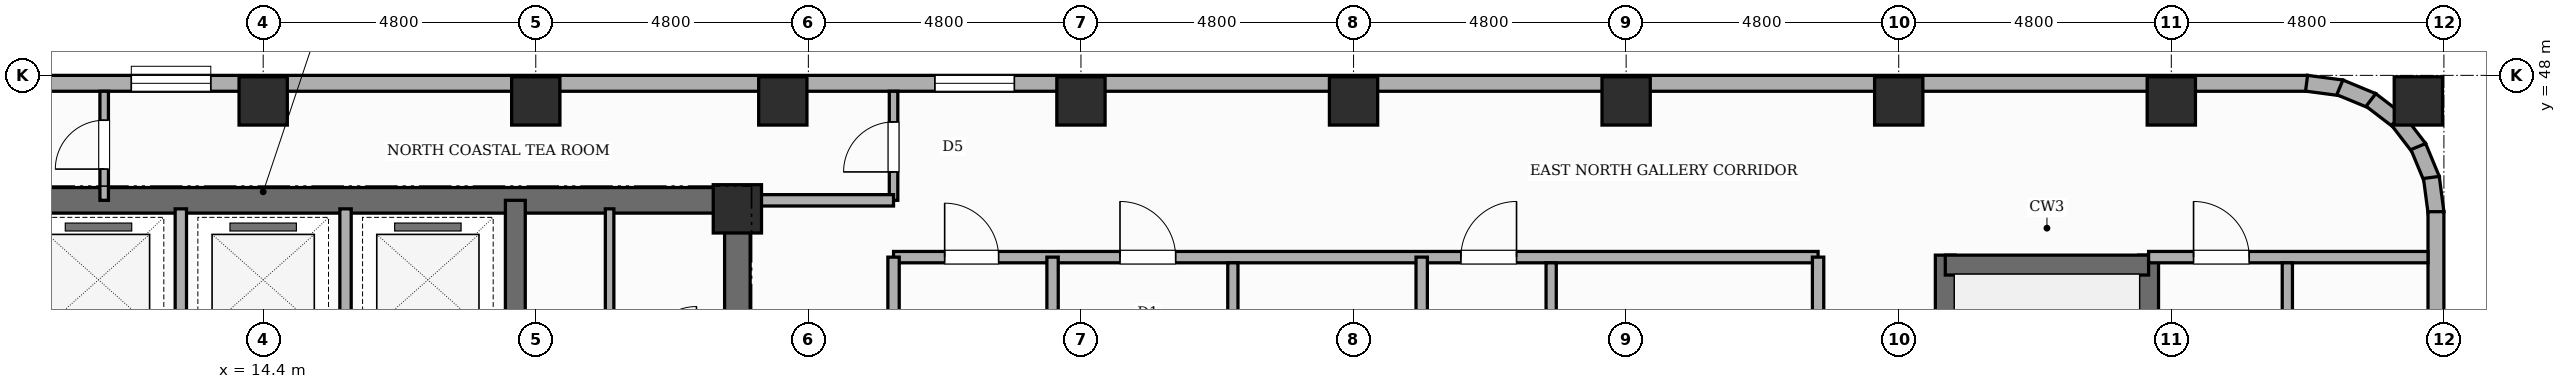
"""IFC4 building model, lengths in metres.
Left out: names, types, materials, properties, quantities, classifications, styles, units other than length and angle.
Written with IfcOpenShell. Run it as: python <this file> out.ifc"""

import sys

from ifc_helpers import new_model, si_unit, direction, frame, frame_2d, origin, origin_2d, place, context, subcontext, project, spatial, rectangle, extrude, element, fill, save


model = new_model("IFC4")
c1 = context("Model", 3, precision=1e-05, world=origin(), true_north=direction((0.0, 1.0)))
c2 = subcontext(c1, "Body", "Model", "MODEL_VIEW")
j1 = project(units=[si_unit("LENGTHUNIT", "METRE"), si_unit("PLANEANGLEUNIT", "RADIAN")], contexts=[c1])
p1 = place(None, origin())
s1 = spatial("IfcSite", under=j1, at=p1, CompositionType="ELEMENT")
p2 = place(p1, origin())
s2 = spatial("IfcBuilding", under=s1, at=p2, CompositionType="ELEMENT")
p3 = place(p2, frame((0.0, 0.0, 207.4)))
s3 = spatial("IfcBuildingStorey", under=s2, at=p3, CompositionType="ELEMENT", Elevation=207.4)
p4 = place(p3, frame((22.75, 30.675, 0.0), z_axis=(0.0, 0.0, 1.0), x_axis=(0.0, 1.0, 0.0)))
e1 = element("IfcWall", 1, at=p4, inside=s3, PredefinedType="SHEAR", context=c2, shape_type="SweptSolid", body=[
    extrude(rectangle(XDim=15.35, YDim=0.45, at=frame_2d((7.675, 0.0))), origin(), (0.0, 0.0, 1.0), 3.6),
])
p5 = place(p4, frame((10.675, 0.0, 0.0)))
e2 = element("IfcOpeningElement", 2, at=p5, cuts=e1, PredefinedType="OPENING", context=c2, shape_type="SweptSolid", body=[
    extrude(rectangle(XDim=1.0, YDim=2.15, at=frame_2d((0.5, 1.075))), frame((0.0, 0.235, 0.0), z_axis=(0.0, -1.0, 0.0), x_axis=(1.0, 0.0, 0.0)), (0.0, 0.0, 1.0), 0.47),
])
p6 = place(p3, frame((6.05, 45.8, 0.0), z_axis=(0.0, 0.0, 1.0), x_axis=(1.0, 0.0, 0.0)))
e3 = element("IfcWall", 3, at=p6, inside=s3, PredefinedType="SHEAR", context=c2, shape_type="SweptSolid", body=[
    extrude(rectangle(XDim=16.7, YDim=0.45, at=frame_2d((8.35, 0.0))), origin(), (0.0, 0.0, 1.0), 3.6),
])
p7 = place(p3, frame((18.84, 30.9, 0.0), z_axis=(0.0, 0.0, 1.0), x_axis=(0.0, 1.0, 0.0)))
e4 = element("IfcWall", 4, at=p7, inside=s3, PredefinedType="SHEAR", context=c2, shape_type="SweptSolid", body=[
    extrude(rectangle(XDim=14.9, YDim=0.35, at=frame_2d((7.45, 0.0))), origin(), (0.0, 0.0, 1.0), 3.6),
])
p8 = place(p7, frame((0.65, 0.0, 0.0)))
e5 = element("IfcOpeningElement", 5, at=p8, cuts=e4, PredefinedType="OPENING", context=c2, shape_type="SweptSolid", body=[
    extrude(rectangle(XDim=0.95, YDim=2.1, at=frame_2d((0.475, 1.05))), frame((0.0, 0.185, 0.0), z_axis=(0.0, -1.0, 0.0), x_axis=(1.0, 0.0, 0.0)), (0.0, 0.0, 1.0), 0.37),
])
p9 = place(p7, frame((10.45, 0.0, 0.0)))
e6 = element("IfcOpeningElement", 6, at=p9, cuts=e4, PredefinedType="OPENING", context=c2, shape_type="SweptSolid", body=[
    extrude(rectangle(XDim=1.0, YDim=2.15, at=frame_2d((0.5, 1.075))), frame((0.0, 0.185, 0.0), z_axis=(0.0, -1.0, 0.0), x_axis=(1.0, 0.0, 0.0)), (0.0, 0.0, 1.0), 0.37),
])
p10 = place(p3, frame((44.02, 35.865, 0.0), z_axis=(0.0, 0.0, 1.0), x_axis=(0.0, 1.0, 0.0)))
e7 = element("IfcWall", 7, at=p10, inside=s3, PredefinedType="SHEAR", context=c2, shape_type="SweptSolid", body=[
    extrude(rectangle(XDim=8.97, YDim=0.35, at=frame_2d((4.485, 0.0))), origin(), (0.0, 0.0, 1.0), 3.6),
])
p11 = place(p10, frame((0.65, 0.0, 0.0)))
e8 = element("IfcOpeningElement", 8, at=p11, cuts=e7, PredefinedType="OPENING", context=c2, shape_type="SweptSolid", body=[
    extrude(rectangle(XDim=0.95, YDim=2.1, at=frame_2d((0.475, 1.05))), frame((0.0, 0.185, 0.0), z_axis=(0.0, -1.0, 0.0), x_axis=(1.0, 0.0, 0.0)), (0.0, 0.0, 1.0), 0.37),
])
p12 = place(p3, frame((47.6, 35.865, 0.0), z_axis=(0.0, 0.0, 1.0), x_axis=(0.0, 1.0, 0.0)))
e9 = element("IfcWall", 9, at=p12, inside=s3, PredefinedType="SHEAR", context=c2, shape_type="SweptSolid", body=[
    extrude(rectangle(XDim=8.97, YDim=0.35, at=frame_2d((4.485, 0.0))), origin(), (0.0, 0.0, 1.0), 3.6),
])
p13 = place(p3, frame((44.02, 44.66, 0.0), z_axis=(0.0, 0.0, 1.0), x_axis=(1.0, 0.0, 0.0)))
e10 = element("IfcWall", 10, at=p13, inside=s3, PredefinedType="SHEAR", context=c2, shape_type="SweptSolid", body=[
    extrude(rectangle(XDim=3.58, YDim=0.35, at=frame_2d((1.79, 0.0))), origin(), (0.0, 0.0, 1.0), 3.6),
])
for number, where, z_axis, x_axis in (
    (11, (14.4, 47.55, 0.0), (0.0, 0.0, 1.0), (1.0, 0.0, 0.0)),
    (12, (19.2, 47.55, 0.0), (0.0, 0.0, 1.0), (1.0, 0.0, 0.0)),
    (13, (22.75, 45.65, 0.0), (0.0, 0.0, 1.0), (1.0, 0.0, 0.0)),
    (14, (23.55, 47.55, 0.0), (0.0, 0.0, 1.0), (1.0, 0.0, 0.0)),
    (15, (28.8, 47.55, 0.0), (0.0, 0.0, 1.0), (1.0, 0.0, 0.0)),
    (16, (33.6, 47.55, 0.0), (0.0, 0.0, 1.0), (1.0, 0.0, 0.0)),
    (17, (38.4, 47.55, 0.0), (0.0, 0.0, 1.0), (1.0, 0.0, 0.0)),
    (18, (43.2, 47.55, 0.0), (0.0, 0.0, 1.0), (1.0, 0.0, 0.0)),
    (19, (48.0, 47.55, 0.0), (0.0, 0.0, 1.0), (1.0, 0.0, 0.0)),
    (20, (52.35, 47.55, 0.0), (0.0, 0.0, 1.0), (1.0, 0.0, 0.0)),
):
    element("IfcColumn", number, at=place(p3, frame(where, z_axis=z_axis, x_axis=x_axis)), inside=s3, PredefinedType="COLUMN", context=c2, shape_type="SweptSolid", body=[
        extrude(rectangle(XDim=0.85, YDim=0.85, at=origin_2d()), origin(), (0.0, 0.0, 1.0), 3.6),
    ])
p14 = place(p3, frame((7.2, 47.86, 0.0), z_axis=(0.0, 0.0, 1.0), x_axis=(1.0, 0.0, 0.0)))
e21 = element("IfcWall", 21, at=p14, inside=s3, PredefinedType="STANDARD", context=c2, shape_type="SweptSolid", body=[
    extrude(rectangle(XDim=43.2, YDim=0.28, at=frame_2d((21.6, 0.0))), origin(), (0.0, 0.0, 1.0), 2.66),
])
p15 = place(p14, frame((19.028, 0.0, 0.65)))
e22 = element("IfcOpeningElement", 22, at=p15, cuts=e21, PredefinedType="OPENING", context=c2, shape_type="SweptSolid", body=[
    extrude(rectangle(XDim=1.4, YDim=1.1, at=frame_2d((0.7, 0.55))), frame((0.0, 0.15, 0.0), z_axis=(0.0, -1.0, 0.0), x_axis=(1.0, 0.0, 0.0)), (0.0, 0.0, 1.0), 0.3),
])
p16 = place(p14, frame((0.308, 0.0, 0.65)))
e23 = element("IfcOpeningElement", 23, at=p16, cuts=e21, PredefinedType="OPENING", context=c2, shape_type="SweptSolid", body=[
    extrude(rectangle(XDim=1.4, YDim=1.1, at=frame_2d((0.7, 0.55))), frame((0.0, 0.15, 0.0), z_axis=(0.0, -1.0, 0.0), x_axis=(1.0, 0.0, 0.0)), (0.0, 0.0, 1.0), 0.3),
])
p17 = place(p14, frame((4.877, 0.0, 0.65)))
e24 = element("IfcOpeningElement", 24, at=p17, cuts=e21, PredefinedType="OPENING", context=c2, shape_type="SweptSolid", body=[
    extrude(rectangle(XDim=1.4, YDim=1.1, at=frame_2d((0.7, 0.55))), frame((0.0, 0.15, 0.0), z_axis=(0.0, -1.0, 0.0), x_axis=(1.0, 0.0, 0.0)), (0.0, 0.0, 1.0), 0.3),
])
p18 = place(p3, frame((50.382, 47.861, 0.0), z_axis=(0.0, 0.0, 1.0), x_axis=(0.991447664465, -0.130504898859, 0.0)))
e25 = element("IfcWall", 25, at=p18, inside=s3, PredefinedType="STANDARD", context=c2, shape_type="SweptSolid", body=[
    extrude(rectangle(XDim=0.627, YDim=0.28, at=frame_2d((0.313, 0.0))), origin(), (0.0, 0.0, 1.0), 2.66),
])
for number, where, z_axis, x_axis in (
    (26, (50.968, 47.789, 0.0), (0.0, 0.0, 1.0), (0.924, -0.382, 0.0)),
    (27, (51.515, 47.567, 0.0), (0.0, 0.0, 1.0), (0.793, -0.609, 0.0)),
    (28, (51.986, 47.212, 0.0), (0.0, 0.0, 1.0), (0.609, -0.793, 0.0)),
    (29, (52.349, 46.746, 0.0), (0.0, 0.0, 1.0), (0.383, -0.924, 0.0)),
    (30, (52.579, 46.203, 0.0), (0.0, 0.0, 1.0), (0.131, -0.991, 0.0)),
):
    element("IfcWall", number, at=place(p3, frame(where, z_axis=z_axis, x_axis=x_axis)), inside=s3, PredefinedType="STANDARD", context=c2, shape_type="SweptSolid", body=[
        extrude(rectangle(XDim=0.626, YDim=0.28, at=frame_2d((0.313, 0.0))), origin(), (0.0, 0.0, 1.0), 2.66),
    ])
p19 = place(p3, frame((52.66, 45.6, 0.0), z_axis=(0.0, 0.0, 1.0), x_axis=(0.0, -1.0, 0.0)))
e31 = element("IfcWall", 31, at=p19, inside=s3, PredefinedType="STANDARD", context=c2, shape_type="SweptSolid", body=[
    extrude(rectangle(XDim=14.4, YDim=0.28, at=frame_2d((7.2, 0.0))), origin(), (0.0, 0.0, 1.0), 2.66),
])
p20 = place(p19, frame((3.75, 0.0, 0.0)))
e32 = element("IfcOpeningElement", 32, at=p20, cuts=e31, PredefinedType="OPENING", context=c2, shape_type="SweptSolid", body=[
    extrude(rectangle(XDim=1.1, YDim=2.15, at=frame_2d((0.55, 1.075))), frame((0.0, 0.15, 0.0), z_axis=(0.0, -1.0, 0.0), x_axis=(1.0, 0.0, 0.0)), (0.0, 0.0, 1.0), 0.3),
])
p21 = place(p19, frame((10.544, 0.0, 0.45)))
e33 = element("IfcOpeningElement", 33, at=p21, cuts=e31, PredefinedType="OPENING", context=c2, shape_type="SweptSolid", body=[
    extrude(rectangle(XDim=0.75, YDim=1.8, at=frame_2d((0.375, 0.9))), frame((0.0, 0.15, 0.0), z_axis=(0.0, -1.0, 0.0), x_axis=(1.0, 0.0, 0.0)), (0.0, 0.0, 1.0), 0.3),
])
p22 = place(p19, frame((5.511, 0.0, 0.45)))
e34 = element("IfcOpeningElement", 34, at=p22, cuts=e31, PredefinedType="OPENING", context=c2, shape_type="SweptSolid", body=[
    extrude(rectangle(XDim=0.95, YDim=1.8, at=frame_2d((0.475, 0.9))), frame((0.0, 0.15, 0.0), z_axis=(0.0, -1.0, 0.0), x_axis=(1.0, 0.0, 0.0)), (0.0, 0.0, 1.0), 0.3),
])
for number, where, z_axis, x_axis in (
    (35, (12.95, 43.1, 0.0), (0.0, 0.0, 1.0), (0.0, 1.0, 0.0)),
    (36, (15.85, 43.1, 0.0), (0.0, 0.0, 1.0), (0.0, 1.0, 0.0)),
):
    element("IfcWall", number, at=place(p3, frame(where, z_axis=z_axis, x_axis=x_axis)), inside=s3, PredefinedType="POLYGONAL", context=c2, shape_type="SweptSolid", body=[
        extrude(rectangle(XDim=2.55, YDim=0.2, at=frame_2d((1.275, 0.0))), origin(), (0.0, 0.0, 1.0), 3.38),
    ])
p23 = place(p3, frame((20.5, 43.05, 0.0), z_axis=(0.0, 0.0, 1.0), x_axis=(0.0, 1.0, 0.0)))
e37 = element("IfcWall", 37, at=p23, inside=s3, PredefinedType="PARTITIONING", context=c2, shape_type="SweptSolid", body=[
    extrude(rectangle(XDim=2.6, YDim=0.15, at=frame_2d((1.3, 0.0))), origin(), (0.0, 0.0, 1.0), 3.38),
])
p24 = place(p3, frame((25.5, 45.8, 0.0), z_axis=(0.0, 0.0, 1.0), x_axis=(0.0, 1.0, 0.0)))
e38 = element("IfcWall", 38, at=p24, inside=s3, PredefinedType="PARTITIONING", context=c2, shape_type="SweptSolid", body=[
    extrude(rectangle(XDim=1.92, YDim=0.15, at=frame_2d((0.96, 0.0))), origin(), (0.0, 0.0, 1.0), 3.38),
])
p25 = place(p24, frame((0.5, 0.0, 0.0)))
e39 = element("IfcOpeningElement", 39, at=p25, cuts=e38, PredefinedType="OPENING", context=c2, shape_type="SweptSolid", body=[
    extrude(rectangle(XDim=0.88, YDim=2.1, at=frame_2d((0.44, 1.05))), frame((0.0, 0.085, 0.0), z_axis=(0.0, -1.0, 0.0), x_axis=(1.0, 0.0, 0.0)), (0.0, 0.0, 1.0), 0.17),
])
p26 = place(p3, frame((22.75, 45.8, 0.0), z_axis=(0.0, 0.0, 1.0), x_axis=(1.0, 0.0, 0.0)))
e40 = element("IfcWall", 40, at=p26, inside=s3, PredefinedType="PARTITIONING", context=c2, shape_type="SweptSolid", body=[
    extrude(rectangle(XDim=2.75, YDim=0.2, at=frame_2d((1.375, 0.0))), origin(), (0.0, 0.0, 1.0), 3.38),
])
p27 = place(p3, frame((11.6, 45.8, 0.0), z_axis=(0.0, 0.0, 1.0), x_axis=(0.0, 1.0, 0.0)))
e41 = element("IfcWall", 41, at=p27, inside=s3, PredefinedType="PARTITIONING", context=c2, shape_type="SweptSolid", body=[
    extrude(rectangle(XDim=1.92, YDim=0.15, at=frame_2d((0.96, 0.0))), origin(), (0.0, 0.0, 1.0), 3.38),
])
p28 = place(p27, frame((0.55, 0.0, 0.0)))
e42 = element("IfcOpeningElement", 42, at=p28, cuts=e41, PredefinedType="OPENING", context=c2, shape_type="SweptSolid", body=[
    extrude(rectangle(XDim=0.86, YDim=2.1, at=frame_2d((0.43, 1.05))), frame((0.0, 0.085, 0.0), z_axis=(0.0, -1.0, 0.0), x_axis=(1.0, 0.0, 0.0)), (0.0, 0.0, 1.0), 0.17),
])
p29 = place(p3, frame((25.5, 44.8, 0.0), z_axis=(0.0, 0.0, 1.0), x_axis=(1.0, 0.0, 0.0)))
e43 = element("IfcWall", 43, at=p29, inside=s3, PredefinedType="PARTITIONING", context=c2, shape_type="SweptSolid", body=[
    extrude(rectangle(XDim=16.28, YDim=0.2, at=frame_2d((8.14, 0.0))), origin(), (0.0, 0.0, 1.0), 3.38),
])
p30 = place(p29, frame((0.9, 0.0, 0.0)))
e44 = element("IfcOpeningElement", 44, at=p30, cuts=e43, PredefinedType="OPENING", context=c2, shape_type="SweptSolid", body=[
    extrude(rectangle(XDim=0.95, YDim=2.15, at=frame_2d((0.475, 1.075))), frame((0.0, 0.11, 0.0), z_axis=(0.0, -1.0, 0.0), x_axis=(1.0, 0.0, 0.0)), (0.0, 0.0, 1.0), 0.22),
])
p31 = place(p29, frame((3.988, 0.0, 0.0)))
e45 = element("IfcOpeningElement", 45, at=p31, cuts=e43, PredefinedType="OPENING", context=c2, shape_type="SweptSolid", body=[
    extrude(rectangle(XDim=0.98, YDim=2.18, at=frame_2d((0.49, 1.09))), frame((0.0, 0.11, 0.0), z_axis=(0.0, -1.0, 0.0), x_axis=(1.0, 0.0, 0.0)), (0.0, 0.0, 1.0), 0.22),
])
p32 = place(p29, frame((9.99, 0.0, 0.0)))
e46 = element("IfcOpeningElement", 46, at=p32, cuts=e43, PredefinedType="OPENING", context=c2, shape_type="SweptSolid", body=[
    extrude(rectangle(XDim=0.98, YDim=2.18, at=frame_2d((0.49, 1.09))), frame((0.0, 0.11, 0.0), z_axis=(0.0, -1.0, 0.0), x_axis=(1.0, 0.0, 0.0)), (0.0, 0.0, 1.0), 0.22),
])
p33 = place(p3, frame((47.6, 44.8, 0.0), z_axis=(0.0, 0.0, 1.0), x_axis=(1.0, 0.0, 0.0)))
e47 = element("IfcWall", 47, at=p33, inside=s3, PredefinedType="PARTITIONING", context=c2, shape_type="SweptSolid", body=[
    extrude(rectangle(XDim=4.92, YDim=0.2, at=frame_2d((2.46, 0.0))), origin(), (0.0, 0.0, 1.0), 3.38),
])
p34 = place(p33, frame((0.792, 0.0, 0.0)))
e48 = element("IfcOpeningElement", 48, at=p34, cuts=e47, PredefinedType="OPENING", context=c2, shape_type="SweptSolid", body=[
    extrude(rectangle(XDim=0.98, YDim=2.18, at=frame_2d((0.49, 1.09))), frame((0.0, 0.11, 0.0), z_axis=(0.0, -1.0, 0.0), x_axis=(1.0, 0.0, 0.0)), (0.0, 0.0, 1.0), 0.22),
])
p35 = place(p3, frame((25.5, 39.95, 0.0), z_axis=(0.0, 0.0, 1.0), x_axis=(0.0, 1.0, 0.0)))
e49 = element("IfcWall", 49, at=p35, inside=s3, PredefinedType="PARTITIONING", context=c2, shape_type="SweptSolid", body=[
    extrude(rectangle(XDim=4.85, YDim=0.2, at=frame_2d((2.425, 0.0))), origin(), (0.0, 0.0, 1.0), 3.38),
])
p36 = place(p3, frame((41.78, 36.05, 0.0), z_axis=(0.0, 0.0, 1.0), x_axis=(0.0, 1.0, 0.0)))
e50 = element("IfcWall", 50, at=p36, inside=s3, PredefinedType="PARTITIONING", context=c2, shape_type="SweptSolid", body=[
    extrude(rectangle(XDim=8.75, YDim=0.2, at=frame_2d((4.375, 0.0))), origin(), (0.0, 0.0, 1.0), 3.38),
])
p37 = place(p3, frame((28.3, 29.08, 0.0), z_axis=(0.0, 0.0, 1.0), x_axis=(0.0, 1.0, 0.0)))
e51 = element("IfcWall", 51, at=p37, inside=s3, PredefinedType="SOLIDWALL", context=c2, shape_type="SweptSolid", body=[
    extrude(rectangle(XDim=15.72, YDim=0.2, at=frame_2d((7.86, 0.0))), origin(), (0.0, 0.0, 1.0), 3.38),
])
p38 = place(p3, frame((31.475, 29.08, 0.0), z_axis=(0.0, 0.0, 1.0), x_axis=(0.0, 1.0, 0.0)))
e52 = element("IfcWall", 52, at=p38, inside=s3, PredefinedType="PLUMBINGWALL", context=c2, shape_type="SweptSolid", body=[
    extrude(rectangle(XDim=15.62, YDim=0.18, at=frame_2d((7.81, 0.0))), origin(), (0.0, 0.0, 1.0), 3.38),
])
p39 = place(p38, frame((2.223, 0.0, 0.0)))
e53 = element("IfcOpeningElement", 53, at=p39, cuts=e52, PredefinedType="OPENING", context=c2, shape_type="SweptSolid", body=[
    extrude(rectangle(XDim=0.9, YDim=2.15, at=frame_2d((0.45, 1.075))), frame((0.0, 0.1, 0.0), z_axis=(0.0, -1.0, 0.0), x_axis=(1.0, 0.0, 0.0)), (0.0, 0.0, 1.0), 0.2),
])
p40 = place(p38, frame((7.999, 0.0, 0.0)))
e54 = element("IfcOpeningElement", 54, at=p40, cuts=e52, PredefinedType="OPENING", context=c2, shape_type="SweptSolid", body=[
    extrude(rectangle(XDim=0.9, YDim=2.15, at=frame_2d((0.45, 1.075))), frame((0.0, 0.1, 0.0), z_axis=(0.0, -1.0, 0.0), x_axis=(1.0, 0.0, 0.0)), (0.0, 0.0, 1.0), 0.2),
])
p41 = place(p38, frame((12.75, 0.0, 0.0)))
e55 = element("IfcOpeningElement", 55, at=p41, cuts=e52, PredefinedType="OPENING", context=c2, shape_type="SweptSolid", body=[
    extrude(rectangle(XDim=0.86, YDim=2.1, at=frame_2d((0.43, 1.05))), frame((0.0, 0.1, 0.0), z_axis=(0.0, -1.0, 0.0), x_axis=(1.0, 0.0, 0.0)), (0.0, 0.0, 1.0), 0.2),
])
p42 = place(p3, frame((34.8, 29.08, 0.0), z_axis=(0.0, 0.0, 1.0), x_axis=(0.0, 1.0, 0.0)))
e56 = element("IfcWall", 56, at=p42, inside=s3, PredefinedType="SOLIDWALL", context=c2, shape_type="SweptSolid", body=[
    extrude(rectangle(XDim=15.72, YDim=0.2, at=frame_2d((7.86, 0.0))), origin(), (0.0, 0.0, 1.0), 3.38),
])
p43 = place(p3, frame((37.08, 29.08, 0.0), z_axis=(0.0, 0.0, 1.0), x_axis=(0.0, 1.0, 0.0)))
e57 = element("IfcWall", 57, at=p43, inside=s3, PredefinedType="PLUMBINGWALL", context=c2, shape_type="SweptSolid", body=[
    extrude(rectangle(XDim=15.62, YDim=0.18, at=frame_2d((7.81, 0.0))), origin(), (0.0, 0.0, 1.0), 3.38),
])
p44 = place(p43, frame((2.195, 0.0, 0.0)))
e58 = element("IfcOpeningElement", 58, at=p44, cuts=e57, PredefinedType="OPENING", context=c2, shape_type="SweptSolid", body=[
    extrude(rectangle(XDim=0.9, YDim=2.15, at=frame_2d((0.45, 1.075))), frame((0.0, 0.1, 0.0), z_axis=(0.0, -1.0, 0.0), x_axis=(1.0, 0.0, 0.0)), (0.0, 0.0, 1.0), 0.2),
])
p45 = place(p43, frame((8.265, 0.0, 0.0)))
e59 = element("IfcOpeningElement", 59, at=p45, cuts=e57, PredefinedType="OPENING", context=c2, shape_type="SweptSolid", body=[
    extrude(rectangle(XDim=0.9, YDim=2.15, at=frame_2d((0.45, 1.075))), frame((0.0, 0.1, 0.0), z_axis=(0.0, -1.0, 0.0), x_axis=(1.0, 0.0, 0.0)), (0.0, 0.0, 1.0), 0.2),
])
p46 = place(p43, frame((13.117, 0.0, 0.0)))
e60 = element("IfcOpeningElement", 60, at=p46, cuts=e57, PredefinedType="OPENING", context=c2, shape_type="SweptSolid", body=[
    extrude(rectangle(XDim=0.86, YDim=2.1, at=frame_2d((0.43, 1.05))), frame((0.0, 0.1, 0.0), z_axis=(0.0, -1.0, 0.0), x_axis=(1.0, 0.0, 0.0)), (0.0, 0.0, 1.0), 0.2),
])
p47 = place(p3, frame((50.043, 29.08, 0.0), z_axis=(0.0, 0.0, 1.0), x_axis=(0.0, 1.0, 0.0)))
e61 = element("IfcWall", 61, at=p47, inside=s3, PredefinedType="PLUMBINGWALL", context=c2, shape_type="SweptSolid", body=[
    extrude(rectangle(XDim=15.62, YDim=0.18, at=frame_2d((7.81, 0.0))), origin(), (0.0, 0.0, 1.0), 3.38),
])
p48 = place(p47, frame((2.223, 0.0, 0.0)))
e62 = element("IfcOpeningElement", 62, at=p48, cuts=e61, PredefinedType="OPENING", context=c2, shape_type="SweptSolid", body=[
    extrude(rectangle(XDim=0.9, YDim=2.15, at=frame_2d((0.45, 1.075))), frame((0.0, 0.1, 0.0), z_axis=(0.0, -1.0, 0.0), x_axis=(1.0, 0.0, 0.0)), (0.0, 0.0, 1.0), 0.2),
])
p49 = place(p47, frame((7.999, 0.0, 0.0)))
e63 = element("IfcOpeningElement", 63, at=p49, cuts=e61, PredefinedType="OPENING", context=c2, shape_type="SweptSolid", body=[
    extrude(rectangle(XDim=0.9, YDim=2.15, at=frame_2d((0.45, 1.075))), frame((0.0, 0.1, 0.0), z_axis=(0.0, -1.0, 0.0), x_axis=(1.0, 0.0, 0.0)), (0.0, 0.0, 1.0), 0.2),
])
p50 = place(p47, frame((12.75, 0.0, 0.0)))
e64 = element("IfcOpeningElement", 64, at=p50, cuts=e61, PredefinedType="OPENING", context=c2, shape_type="SweptSolid", body=[
    extrude(rectangle(XDim=0.86, YDim=2.1, at=frame_2d((0.43, 1.05))), frame((0.0, 0.1, 0.0), z_axis=(0.0, -1.0, 0.0), x_axis=(1.0, 0.0, 0.0)), (0.0, 0.0, 1.0), 0.2),
])
p51 = place(p15, origin())
e65 = element("IfcWindow", 65, at=p51, inside=s3, PartitioningType="SINGLE_PANEL", PredefinedType="WINDOW", context=c2, shape_type="SweptSolid", body=[
    extrude(rectangle(XDim=1.4, YDim=1.1, at=frame_2d((0.7, 0.55))), frame((0.0, 0.03, 0.0), z_axis=(0.0, -1.0, 0.0), x_axis=(1.0, 0.0, 0.0)), (0.0, 0.0, 1.0), 0.06),
])
fill(e22, e65)
p52 = place(p17, origin())
e66 = element("IfcWindow", 66, at=p52, inside=s3, PartitioningType="SINGLE_PANEL", PredefinedType="WINDOW", context=c2, shape_type="SweptSolid", body=[
    extrude(rectangle(XDim=1.4, YDim=1.1, at=frame_2d((0.7, 0.55))), frame((0.0, 0.03, 0.0), z_axis=(0.0, -1.0, 0.0), x_axis=(1.0, 0.0, 0.0)), (0.0, 0.0, 1.0), 0.06),
])
fill(e24, e66)
p53 = place(p25, origin())
e67 = element("IfcDoor", 67, at=p53, inside=s3, OperationType="SINGLE_SWING_LEFT", PredefinedType="DOOR", context=c2, shape_type="SweptSolid", body=[
    extrude(rectangle(XDim=0.88, YDim=2.1, at=frame_2d((0.44, 1.05))), frame((0.0, 0.025, 0.0), z_axis=(0.0, -1.0, 0.0), x_axis=(1.0, 0.0, 0.0)), (0.0, 0.0, 1.0), 0.05),
])
fill(e39, e67)
p54 = place(p28, origin())
e68 = element("IfcDoor", 68, at=p54, inside=s3, OperationType="SINGLE_SWING_LEFT", PredefinedType="DOOR", context=c2, shape_type="SweptSolid", body=[
    extrude(rectangle(XDim=0.86, YDim=2.1, at=frame_2d((0.43, 1.05))), frame((0.0, 0.025, 0.0), z_axis=(0.0, -1.0, 0.0), x_axis=(1.0, 0.0, 0.0)), (0.0, 0.0, 1.0), 0.05),
])
fill(e42, e68)
p55 = place(p30, origin())
e69 = element("IfcDoor", 69, at=p55, inside=s3, OperationType="SINGLE_SWING_LEFT", PredefinedType="DOOR", context=c2, shape_type="SweptSolid", body=[
    extrude(rectangle(XDim=0.95, YDim=2.15, at=frame_2d((0.475, 1.075))), frame((0.0, 0.025, 0.0), z_axis=(0.0, -1.0, 0.0), x_axis=(1.0, 0.0, 0.0)), (0.0, 0.0, 1.0), 0.05),
])
fill(e44, e69)
p56 = place(p31, origin())
e70 = element("IfcDoor", 70, at=p56, inside=s3, OperationType="SINGLE_SWING_LEFT", PredefinedType="DOOR", context=c2, shape_type="SweptSolid", body=[
    extrude(rectangle(XDim=0.98, YDim=2.18, at=frame_2d((0.49, 1.09))), frame((0.0, 0.025, 0.0), z_axis=(0.0, -1.0, 0.0), x_axis=(1.0, 0.0, 0.0)), (0.0, 0.0, 1.0), 0.05),
])
fill(e45, e70)
p57 = place(p32, origin())
e71 = element("IfcDoor", 71, at=p57, inside=s3, OperationType="SINGLE_SWING_RIGHT", PredefinedType="DOOR", context=c2, shape_type="SweptSolid", body=[
    extrude(rectangle(XDim=0.98, YDim=2.18, at=frame_2d((0.49, 1.09))), frame((0.0, 0.025, 0.0), z_axis=(0.0, -1.0, 0.0), x_axis=(1.0, 0.0, 0.0)), (0.0, 0.0, 1.0), 0.05),
])
fill(e46, e71)
p58 = place(p34, origin())
e72 = element("IfcDoor", 72, at=p58, inside=s3, OperationType="SINGLE_SWING_LEFT", PredefinedType="DOOR", context=c2, shape_type="SweptSolid", body=[
    extrude(rectangle(XDim=0.98, YDim=2.18, at=frame_2d((0.49, 1.09))), frame((0.0, 0.025, 0.0), z_axis=(0.0, -1.0, 0.0), x_axis=(1.0, 0.0, 0.0)), (0.0, 0.0, 1.0), 0.05),
])
fill(e48, e72)
save(model, sys.argv[1])
